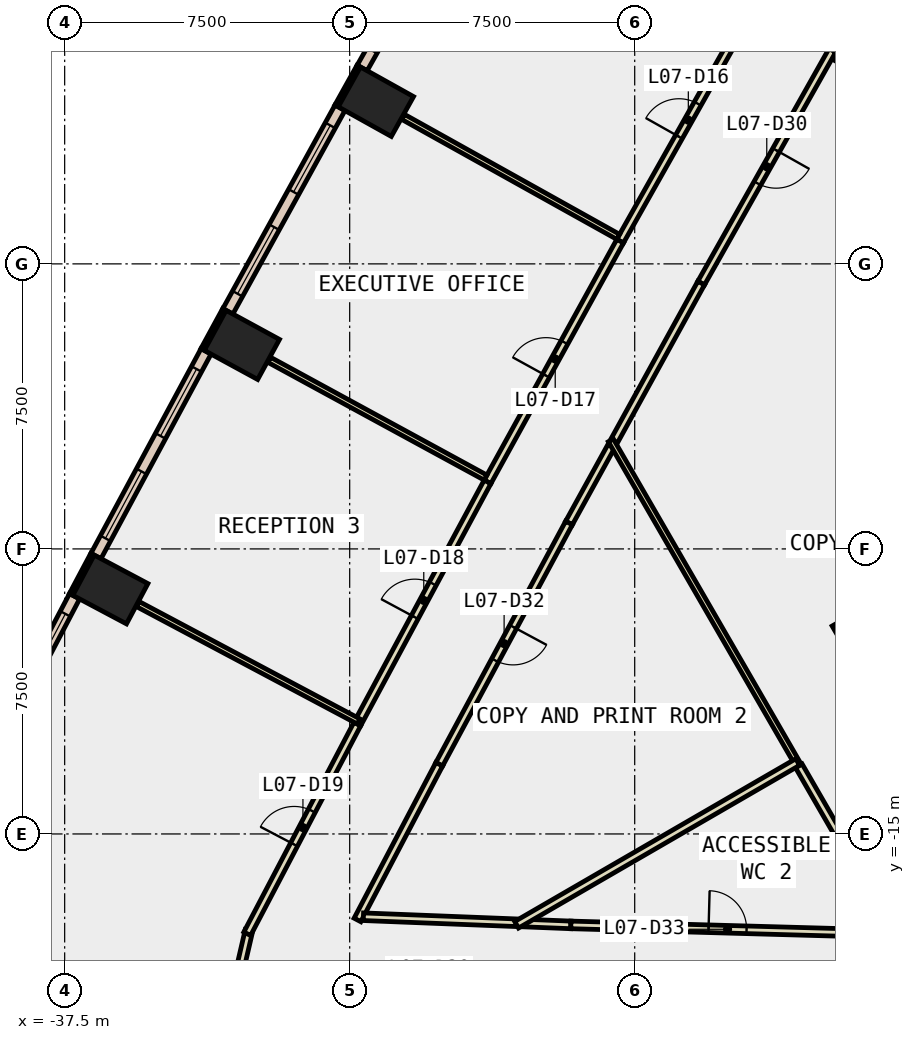
"""IFC4 building model, lengths in metres.
Left out: names, types, materials, properties, quantities, classifications, styles, units other than length and angle.
Written with IfcOpenShell. Run it as: python <this file> out.ifc"""

import sys

from ifc_helpers import new_model, si_unit, direction, frame, frame_2d, origin, origin_2d, place, context, subcontext, project, spatial, rectangle, extrude, element, fill, save


model = new_model("IFC4")
c1 = context("Model", 3, precision=1e-05, world=origin(), true_north=direction((0.0, 1.0)))
c2 = subcontext(c1, "Body", "Model", "MODEL_VIEW")
j1 = project(units=[si_unit("LENGTHUNIT", "METRE"), si_unit("PLANEANGLEUNIT", "RADIAN")], contexts=[c1])
p1 = place(None, origin())
s1 = spatial("IfcSite", under=j1, at=p1, CompositionType="ELEMENT")
p2 = place(p1, origin())
s2 = spatial("IfcBuilding", under=s1, at=p2, CompositionType="ELEMENT")
p3 = place(p2, frame((0.0, 0.0, 39.2)))
s3 = spatial("IfcBuildingStorey", under=s2, at=p3, CompositionType="ELEMENT", Elevation=39.2)
for number, where, z_axis, x_axis in (
    (1, (-29.311, 4.267, -0.4), (0.0, 0.0, 1.0), (0.487, 0.873, 0.0)),
    (2, (-32.837, -2.132, -0.4), (0.0, 0.0, 1.0), (0.478, 0.878, 0.0)),
    (3, (-36.298, -8.567, -0.4), (0.0, 0.0, 1.0), (0.469, 0.883, 0.0)),
):
    element("IfcColumn", number, at=place(p3, frame(where, z_axis=z_axis, x_axis=x_axis)), inside=s3, PredefinedType="COLUMN", context=c2, shape_type="SweptSolid", body=[
        extrude(rectangle(XDim=1.2, YDim=1.6, at=origin_2d()), origin(), (0.0, 0.0, 1.0), 4.2),
    ])
p4 = place(p3, frame((-9.31, -5.375, -0.4), z_axis=(0.0, 0.0, 1.0), x_axis=(-0.866017533419, -0.500013631625, 0.0)))
e4 = element("IfcWall", 4, at=p4, inside=s3, PredefinedType="SHEAR", context=c2, shape_type="SweptSolid", body=[
    extrude(rectangle(XDim=9.0, YDim=0.8, at=frame_2d((4.5, 0.0))), origin(), (0.0, 0.0, 1.0), 4.2),
])
p5 = place(p3, frame((-29.761, 5.205, 0.0), z_axis=(0.0, 0.0, 1.0), x_axis=(-0.486730996044, -0.87355190887, 0.0)))
e5 = element("IfcWall", 5, at=p5, inside=s3, PredefinedType="STANDARD", context=c2, shape_type="SweptSolid", body=[
    extrude(rectangle(XDim=1.2, YDim=0.1, at=frame_2d((0.6, 0.0))), origin(), (0.0, 0.0, 1.0), 3.8),
])
p6 = place(p3, frame((-33.296, -1.199, 0.0), z_axis=(0.0, 0.0, 1.0), x_axis=(-0.478424520456, -0.878128679765, 0.0)))
e6 = element("IfcWall", 6, at=p6, inside=s3, PredefinedType="STANDARD", context=c2, shape_type="SweptSolid", body=[
    extrude(rectangle(XDim=1.2, YDim=0.1, at=frame_2d((0.6, 0.0))), origin(), (0.0, 0.0, 1.0), 3.8),
])
p7 = place(p3, frame((-36.767, -7.639, 0.0), z_axis=(0.0, 0.0, 1.0), x_axis=(-0.469383408131, -0.882994459876, 0.0)))
e7 = element("IfcWall", 7, at=p7, inside=s3, PredefinedType="STANDARD", context=c2, shape_type="SweptSolid", body=[
    extrude(rectangle(XDim=1.199, YDim=0.1, at=frame_2d((0.6, 0.0))), origin(), (0.0, 0.0, 1.0), 3.8),
])
p8 = place(p3, frame((-26.667, 10.482, 0.0), z_axis=(0.0, 0.0, 1.0), x_axis=(-0.491278487323, -0.871002553322, 0.0)))
e8 = element("IfcWall", 8, at=p8, inside=s3, PredefinedType="STANDARD", context=c2, shape_type="SweptSolid", body=[
    extrude(rectangle(XDim=6.117, YDim=0.3, at=frame_2d((3.059, 0.0))), origin(), (0.0, 0.0, 1.0), 3.8),
])
p9 = place(p8, frame((0.529, 0.0, 0.9)))
e9 = element("IfcOpeningElement", 9, at=p9, cuts=e8, PredefinedType="OPENING", context=c2, shape_type="SweptSolid", body=[
    extrude(rectangle(XDim=2.0, YDim=2.6, at=frame_2d((1.0, 1.3))), frame((0.0, 0.16, 0.0), z_axis=(0.0, -1.0, 0.0), x_axis=(1.0, 0.0, 0.0)), (0.0, 0.0, 1.0), 0.32),
])
p10 = place(p8, frame((3.588, 0.0, 0.9)))
e10 = element("IfcOpeningElement", 10, at=p10, cuts=e8, PredefinedType="OPENING", context=c2, shape_type="SweptSolid", body=[
    extrude(rectangle(XDim=2.0, YDim=2.6, at=frame_2d((1.0, 1.3))), frame((0.0, 0.16, 0.0), z_axis=(0.0, -1.0, 0.0), x_axis=(1.0, 0.0, 0.0)), (0.0, 0.0, 1.0), 0.32),
])
p11 = place(p3, frame((-30.255, 4.107, 0.0), z_axis=(0.0, 0.0, 1.0), x_axis=(-0.482596003603, -0.875843078015, 0.0)))
e11 = element("IfcWall", 11, at=p11, inside=s3, PredefinedType="STANDARD", context=c2, shape_type="SweptSolid", body=[
    extrude(rectangle(XDim=6.115, YDim=0.3, at=frame_2d((3.058, 0.0))), origin(), (0.0, 0.0, 1.0), 3.8),
])
p12 = place(p11, frame((0.529, 0.0, 0.9)))
e12 = element("IfcOpeningElement", 12, at=p12, cuts=e11, PredefinedType="OPENING", context=c2, shape_type="SweptSolid", body=[
    extrude(rectangle(XDim=2.0, YDim=2.6, at=frame_2d((1.0, 1.3))), frame((0.0, 0.16, 0.0), z_axis=(0.0, -1.0, 0.0), x_axis=(1.0, 0.0, 0.0)), (0.0, 0.0, 1.0), 0.32),
])
p13 = place(p11, frame((3.586, 0.0, 0.9)))
e13 = element("IfcOpeningElement", 13, at=p13, cuts=e11, PredefinedType="OPENING", context=c2, shape_type="SweptSolid", body=[
    extrude(rectangle(XDim=2.0, YDim=2.6, at=frame_2d((1.0, 1.3))), frame((0.0, 0.16, 0.0), z_axis=(0.0, -1.0, 0.0), x_axis=(1.0, 0.0, 0.0)), (0.0, 0.0, 1.0), 0.32),
])
p14 = place(p3, frame((-33.779, -2.301, 0.0), z_axis=(0.0, 0.0, 1.0), x_axis=(-0.47375467653, -0.880656860795, 0.0)))
e14 = element("IfcWall", 14, at=p14, inside=s3, PredefinedType="STANDARD", context=c2, shape_type="SweptSolid", body=[
    extrude(rectangle(XDim=6.117, YDim=0.3, at=frame_2d((3.059, 0.0))), origin(), (0.0, 0.0, 1.0), 3.8),
])
p15 = place(p14, frame((0.529, 0.0, 0.9)))
e15 = element("IfcOpeningElement", 15, at=p15, cuts=e14, PredefinedType="OPENING", context=c2, shape_type="SweptSolid", body=[
    extrude(rectangle(XDim=2.0, YDim=2.6, at=frame_2d((1.0, 1.3))), frame((0.0, 0.16, 0.0), z_axis=(0.0, -1.0, 0.0), x_axis=(1.0, 0.0, 0.0)), (0.0, 0.0, 1.0), 0.32),
])
p16 = place(p14, frame((3.588, 0.0, 0.9)))
e16 = element("IfcOpeningElement", 16, at=p16, cuts=e14, PredefinedType="OPENING", context=c2, shape_type="SweptSolid", body=[
    extrude(rectangle(XDim=2.0, YDim=2.6, at=frame_2d((1.0, 1.3))), frame((0.0, 0.16, 0.0), z_axis=(0.0, -1.0, 0.0), x_axis=(1.0, 0.0, 0.0)), (0.0, 0.0, 1.0), 0.32),
])
p17 = place(p3, frame((-37.239, -8.746, 0.0), z_axis=(0.0, 0.0, 1.0), x_axis=(-0.464913987781, -0.885355851602, 0.0)))
e17 = element("IfcWall", 17, at=p17, inside=s3, PredefinedType="STANDARD", context=c2, shape_type="SweptSolid", body=[
    extrude(rectangle(XDim=6.094, YDim=0.3, at=frame_2d((3.047, 0.0))), origin(), (0.0, 0.0, 1.0), 3.8),
])
p18 = place(p17, frame((0.523, 0.0, 0.9)))
e18 = element("IfcOpeningElement", 18, at=p18, cuts=e17, PredefinedType="OPENING", context=c2, shape_type="SweptSolid", body=[
    extrude(rectangle(XDim=2.0, YDim=2.6, at=frame_2d((1.0, 1.3))), frame((0.0, 0.16, 0.0), z_axis=(0.0, -1.0, 0.0), x_axis=(1.0, 0.0, 0.0)), (0.0, 0.0, 1.0), 0.32),
])
p19 = place(p17, frame((3.57, 0.0, 0.9)))
e19 = element("IfcOpeningElement", 19, at=p19, cuts=e17, PredefinedType="OPENING", context=c2, shape_type="SweptSolid", body=[
    extrude(rectangle(XDim=2.0, YDim=2.6, at=frame_2d((1.0, 1.3))), frame((0.0, 0.16, 0.0), z_axis=(0.0, -1.0, 0.0), x_axis=(1.0, 0.0, 0.0)), (0.0, 0.0, 1.0), 0.32),
])
p20 = place(p3, frame((-17.261, 5.48, 0.0), z_axis=(0.0, 0.0, 1.0), x_axis=(0.865949187497, -0.500131987253, 0.0)))
e20 = element("IfcWall", 20, at=p20, inside=s3, PredefinedType="PARTITIONING", context=c2, shape_type="SweptSolid", body=[
    extrude(rectangle(XDim=3.939, YDim=0.2, at=frame_2d((1.969, 0.0))), origin(), (0.0, 0.0, 1.0), 3.8),
])
p21 = place(p3, frame((-17.299, 5.617, 0.0), z_axis=(0.0, 0.0, 1.0), x_axis=(-0.491166441632, -0.871065741844, 0.0)))
e21 = element("IfcWall", 21, at=p21, inside=s3, PredefinedType="PARTITIONING", context=c2, shape_type="SweptSolid", body=[
    extrude(rectangle(XDim=7.028, YDim=0.2, at=frame_2d((3.514, 0.0))), origin(), (0.0, 0.0, 1.0), 3.8),
])
p22 = place(p21, frame((3.014, 0.0, 0.0)))
e22 = element("IfcOpeningElement", 22, at=p22, cuts=e21, PredefinedType="OPENING", context=c2, shape_type="SweptSolid", body=[
    extrude(rectangle(XDim=1.0, YDim=2.1, at=frame_2d((0.5, 1.05))), frame((0.0, 0.11, 0.0), z_axis=(0.0, -1.0, 0.0), x_axis=(1.0, 0.0, 0.0)), (0.0, 0.0, 1.0), 0.22),
])
p23 = place(p3, frame((-20.751, -0.505, 0.0), z_axis=(0.0, 0.0, 1.0), x_axis=(-0.482566110981, -0.875859548405, 0.0)))
e23 = element("IfcWall", 23, at=p23, inside=s3, PredefinedType="PARTITIONING", context=c2, shape_type="SweptSolid", body=[
    extrude(rectangle(XDim=4.748, YDim=0.2, at=frame_2d((2.374, 0.0))), origin(), (0.0, 0.0, 1.0), 3.8),
])
p24 = place(p3, frame((-23.114, -4.794, 0.0), z_axis=(0.0, 0.0, 1.0), x_axis=(-0.482482362329, -0.875905685586, 0.0)))
e24 = element("IfcWall", 24, at=p24, inside=s3, PredefinedType="PARTITIONING", context=c2, shape_type="SweptSolid", body=[
    extrude(rectangle(XDim=2.311, YDim=0.2, at=frame_2d((1.156, 0.0))), origin(), (0.0, 0.0, 1.0), 3.8),
])
p25 = place(p3, frame((-24.229, -6.818, 0.0), z_axis=(0.0, 0.0, 1.0), x_axis=(-0.473714049803, -0.88067871498, 0.0)))
e25 = element("IfcWall", 25, at=p25, inside=s3, PredefinedType="PARTITIONING", context=c2, shape_type="SweptSolid", body=[
    extrude(rectangle(XDim=7.209, YDim=0.2, at=frame_2d((3.604, 0.0))), origin(), (0.0, 0.0, 1.0), 3.8),
])
p26 = place(p25, frame((3.104, 0.0, 0.0)))
e26 = element("IfcOpeningElement", 26, at=p26, cuts=e25, PredefinedType="OPENING", context=c2, shape_type="SweptSolid", body=[
    extrude(rectangle(XDim=1.0, YDim=2.1, at=frame_2d((0.5, 1.05))), frame((0.0, 0.11, 0.0), z_axis=(0.0, -1.0, 0.0), x_axis=(1.0, 0.0, 0.0)), (0.0, 0.0, 1.0), 0.22),
])
p27 = place(p3, frame((-27.644, -13.167, 0.0), z_axis=(0.0, 0.0, 1.0), x_axis=(-0.464919738277, -0.885352831904, 0.0)))
e27 = element("IfcWall", 27, at=p27, inside=s3, PredefinedType="PARTITIONING", context=c2, shape_type="SweptSolid", body=[
    extrude(rectangle(XDim=4.626, YDim=0.2, at=frame_2d((2.313, 0.0))), origin(), (0.0, 0.0, 1.0), 3.8),
])
p28 = place(p3, frame((-29.639, -17.178, 0.0), z_axis=(0.0, 0.0, 1.0), x_axis=(0.999228076722, -0.039284229546, 0.0)))
e28 = element("IfcWall", 28, at=p28, inside=s3, PredefinedType="PARTITIONING", context=c2, shape_type="SweptSolid", body=[
    extrude(rectangle(XDim=4.021, YDim=0.2, at=frame_2d((2.01, 0.0))), origin(), (0.0, 0.0, 1.0), 3.8),
])
p29 = place(p3, frame((-25.421, -17.344, 0.0), z_axis=(0.0, 0.0, 1.0), x_axis=(0.999219068508, -0.039512695804, 0.0)))
e29 = element("IfcWall", 29, at=p29, inside=s3, PredefinedType="PARTITIONING", context=c2, shape_type="SweptSolid", body=[
    extrude(rectangle(XDim=1.242, YDim=0.2, at=frame_2d((0.621, 0.0))), origin(), (0.0, 0.0, 1.0), 3.8),
])
p30 = place(p3, frame((-24.18, -17.393, 0.0), z_axis=(0.0, 0.0, 1.0), x_axis=(0.999611380121, -0.02787631132, 0.0)))
e30 = element("IfcWall", 30, at=p30, inside=s3, PredefinedType="PARTITIONING", context=c2, shape_type="SweptSolid", body=[
    extrude(rectangle(XDim=8.25, YDim=0.2, at=frame_2d((4.125, 0.0))), origin(), (0.0, 0.0, 1.0), 3.8),
])
p31 = place(p30, frame((3.625, 0.0, 0.0)))
e31 = element("IfcOpeningElement", 31, at=p31, cuts=e30, PredefinedType="OPENING", context=c2, shape_type="SweptSolid", body=[
    extrude(rectangle(XDim=1.0, YDim=2.1, at=frame_2d((0.5, 1.05))), frame((0.0, 0.11, 0.0), z_axis=(0.0, -1.0, 0.0), x_axis=(1.0, 0.0, 0.0)), (0.0, 0.0, 1.0), 0.22),
])
p32 = place(p3, frame((-22.884, 0.598, 0.0), z_axis=(0.0, 0.0, 1.0), x_axis=(0.491206176175, 0.871043335597, 0.0)))
e32 = element("IfcWall", 32, at=p32, inside=s3, PredefinedType="PARTITIONING", context=c2, shape_type="SweptSolid", body=[
    extrude(rectangle(XDim=7.309, YDim=0.2, at=frame_2d((3.654, 0.0))), origin(), (0.0, 0.0, 1.0), 3.8),
])
p33 = place(p32, frame((3.154, 0.0, 0.0)))
e33 = element("IfcOpeningElement", 33, at=p33, cuts=e32, PredefinedType="OPENING", context=c2, shape_type="SweptSolid", body=[
    extrude(rectangle(XDim=1.0, YDim=2.1, at=frame_2d((0.5, 1.05))), frame((0.0, 0.11, 0.0), z_axis=(0.0, -1.0, 0.0), x_axis=(1.0, 0.0, 0.0)), (0.0, 0.0, 1.0), 0.22),
])
p34 = place(p3, frame((-26.373, -5.736, 0.0), z_axis=(0.0, 0.0, 1.0), x_axis=(0.482587313112, 0.875847866483, 0.0)))
e34 = element("IfcWall", 34, at=p34, inside=s3, PredefinedType="PARTITIONING", context=c2, shape_type="SweptSolid", body=[
    extrude(rectangle(XDim=7.232, YDim=0.2, at=frame_2d((3.616, 0.0))), origin(), (0.0, 0.0, 1.0), 3.8),
])
p35 = place(p34, frame((3.191, 0.0, 0.0)))
e35 = element("IfcOpeningElement", 35, at=p35, cuts=e34, PredefinedType="OPENING", context=c2, shape_type="SweptSolid", body=[
    extrude(rectangle(XDim=1.0, YDim=2.1, at=frame_2d((0.5, 1.05))), frame((0.0, 0.11, 0.0), z_axis=(0.0, -1.0, 0.0), x_axis=(1.0, 0.0, 0.0)), (0.0, 0.0, 1.0), 0.22),
])
p36 = place(p3, frame((-29.799, -12.106, 0.0), z_axis=(0.0, 0.0, 1.0), x_axis=(0.473681086062, 0.880696445268, 0.0)))
e36 = element("IfcWall", 36, at=p36, inside=s3, PredefinedType="PARTITIONING", context=c2, shape_type="SweptSolid", body=[
    extrude(rectangle(XDim=7.233, YDim=0.2, at=frame_2d((3.616, 0.0))), origin(), (0.0, 0.0, 1.0), 3.8),
])
p37 = place(p36, frame((3.191, 0.0, 0.0)))
e37 = element("IfcOpeningElement", 37, at=p37, cuts=e36, PredefinedType="OPENING", context=c2, shape_type="SweptSolid", body=[
    extrude(rectangle(XDim=1.0, YDim=2.1, at=frame_2d((0.5, 1.05))), frame((0.0, 0.11, 0.0), z_axis=(0.0, -1.0, 0.0), x_axis=(1.0, 0.0, 0.0)), (0.0, 0.0, 1.0), 0.22),
])
p38 = place(p3, frame((-32.96, -18.874, 0.0), z_axis=(0.0, 0.0, 1.0), x_axis=(0.226081445763, 0.974108402531, 0.0)))
e38 = element("IfcWall", 38, at=p38, inside=s3, PredefinedType="PARTITIONING", context=c2, shape_type="SweptSolid", body=[
    extrude(rectangle(XDim=1.371, YDim=0.2, at=frame_2d((0.686, 0.0))), origin(), (0.0, 0.0, 1.0), 3.8),
])
p39 = place(p3, frame((-32.696, -17.626, 0.0), z_axis=(0.0, 0.0, 1.0), x_axis=(0.464767882002, 0.885432558617, 0.0)))
e39 = element("IfcWall", 39, at=p39, inside=s3, PredefinedType="PARTITIONING", context=c2, shape_type="SweptSolid", body=[
    extrude(rectangle(XDim=6.233, YDim=0.2, at=frame_2d((3.117, 0.0))), origin(), (0.0, 0.0, 1.0), 3.8),
])
p40 = place(p39, frame((2.654, 0.0, 0.0)))
e40 = element("IfcOpeningElement", 40, at=p40, cuts=e39, PredefinedType="OPENING", context=c2, shape_type="SweptSolid", body=[
    extrude(rectangle(XDim=1.0, YDim=2.1, at=frame_2d((0.5, 1.05))), frame((0.0, 0.11, 0.0), z_axis=(0.0, -1.0, 0.0), x_axis=(1.0, 0.0, 0.0)), (0.0, 0.0, 1.0), 0.22),
])
p41 = place(p3, frame((-18.182, -13.207, 0.0), z_axis=(0.0, 0.0, 1.0), x_axis=(-0.500081416649, 0.865978392757, 0.0)))
e41 = element("IfcWall", 41, at=p41, inside=s3, PredefinedType="PARTITIONING", context=c2, shape_type="SweptSolid", body=[
    extrude(rectangle(XDim=9.89, YDim=0.15, at=frame_2d((4.945, 0.0))), origin(), (0.0, 0.0, 1.0), 3.8),
])
p42 = place(p3, frame((-16.171, -16.692, 0.0), z_axis=(0.0, 0.0, 1.0), x_axis=(-0.499813503007, 0.866133051102, 0.0)))
e42 = element("IfcWall", 42, at=p42, inside=s3, PredefinedType="PARTITIONING", context=c2, shape_type="SweptSolid", body=[
    extrude(rectangle(XDim=4.023, YDim=0.2, at=frame_2d((2.012, 0.0))), origin(), (0.0, 0.0, 1.0), 3.8),
])
p43 = place(p3, frame((-18.211, -13.108, 0.0), z_axis=(0.0, 0.0, 1.0), x_axis=(-0.865421721769, -0.501044153235, 0.0)))
e43 = element("IfcWall", 43, at=p43, inside=s3, PredefinedType="PARTITIONING", context=c2, shape_type="SweptSolid", body=[
    extrude(rectangle(XDim=8.546, YDim=0.2, at=frame_2d((4.273, 0.0))), origin(), (0.0, 0.0, 1.0), 3.8),
])
p44 = place(p3, frame((-22.935, 0.712, 0.0), z_axis=(0.0, 0.0, 1.0), x_axis=(-0.873395616379, 0.487011393389, 0.0)))
e44 = element("IfcWall", 44, at=p44, inside=s3, PredefinedType="PARTITIONING", context=c2, shape_type="SweptSolid", body=[
    extrude(rectangle(XDim=6.48, YDim=0.15, at=frame_2d((3.24, 0.0))), origin(), (0.0, 0.0, 1.0), 3.8),
])
p45 = place(p3, frame((-26.425, -5.623, 0.0), z_axis=(0.0, 0.0, 1.0), x_axis=(-0.87825523631, 0.478192157919, 0.0)))
e45 = element("IfcWall", 45, at=p45, inside=s3, PredefinedType="PARTITIONING", context=c2, shape_type="SweptSolid", body=[
    extrude(rectangle(XDim=6.481, YDim=0.15, at=frame_2d((3.24, 0.0))), origin(), (0.0, 0.0, 1.0), 3.8),
])
p46 = place(p3, frame((-29.764, -12.04, 0.0), z_axis=(0.0, 0.0, 1.0), x_axis=(-0.883018657393, 0.469337885426, 0.0)))
e46 = element("IfcWall", 46, at=p46, inside=s3, PredefinedType="PARTITIONING", context=c2, shape_type="SweptSolid", body=[
    extrude(rectangle(XDim=6.58, YDim=0.15, at=frame_2d((3.29, 0.0))), origin(), (0.0, 0.0, 1.0), 3.8),
])
p47 = place(p12, origin())
e47 = element("IfcWindow", 47, at=p47, inside=s3, PartitioningType="SINGLE_PANEL", PredefinedType="WINDOW", context=c2, shape_type="SweptSolid", body=[
    extrude(rectangle(XDim=2.0, YDim=2.6, at=frame_2d((1.0, 1.3))), frame((0.0, 0.03, 0.0), z_axis=(0.0, -1.0, 0.0), x_axis=(1.0, 0.0, 0.0)), (0.0, 0.0, 1.0), 0.06),
])
fill(e12, e47)
p48 = place(p13, origin())
e48 = element("IfcWindow", 48, at=p48, inside=s3, PartitioningType="SINGLE_PANEL", PredefinedType="WINDOW", context=c2, shape_type="SweptSolid", body=[
    extrude(rectangle(XDim=2.0, YDim=2.6, at=frame_2d((1.0, 1.3))), frame((0.0, 0.03, 0.0), z_axis=(0.0, -1.0, 0.0), x_axis=(1.0, 0.0, 0.0)), (0.0, 0.0, 1.0), 0.06),
])
fill(e13, e48)
p49 = place(p15, origin())
e49 = element("IfcWindow", 49, at=p49, inside=s3, PartitioningType="SINGLE_PANEL", PredefinedType="WINDOW", context=c2, shape_type="SweptSolid", body=[
    extrude(rectangle(XDim=2.0, YDim=2.6, at=frame_2d((1.0, 1.3))), frame((0.0, 0.03, 0.0), z_axis=(0.0, -1.0, 0.0), x_axis=(1.0, 0.0, 0.0)), (0.0, 0.0, 1.0), 0.06),
])
fill(e15, e49)
p50 = place(p16, origin())
e50 = element("IfcWindow", 50, at=p50, inside=s3, PartitioningType="SINGLE_PANEL", PredefinedType="WINDOW", context=c2, shape_type="SweptSolid", body=[
    extrude(rectangle(XDim=2.0, YDim=2.6, at=frame_2d((1.0, 1.3))), frame((0.0, 0.03, 0.0), z_axis=(0.0, -1.0, 0.0), x_axis=(1.0, 0.0, 0.0)), (0.0, 0.0, 1.0), 0.06),
])
fill(e16, e50)
p51 = place(p18, origin())
e51 = element("IfcWindow", 51, at=p51, inside=s3, PartitioningType="SINGLE_PANEL", PredefinedType="WINDOW", context=c2, shape_type="SweptSolid", body=[
    extrude(rectangle(XDim=2.0, YDim=2.6, at=frame_2d((1.0, 1.3))), frame((0.0, 0.03, 0.0), z_axis=(0.0, -1.0, 0.0), x_axis=(1.0, 0.0, 0.0)), (0.0, 0.0, 1.0), 0.06),
])
fill(e18, e51)
p52 = place(p33, origin())
e52 = element("IfcDoor", 52, at=p52, inside=s3, OperationType="SINGLE_SWING_RIGHT", PredefinedType="DOOR", context=c2, shape_type="SweptSolid", body=[
    extrude(rectangle(XDim=1.0, YDim=2.1, at=frame_2d((0.5, 1.05))), frame((0.0, 0.025, 0.0), z_axis=(0.0, -1.0, 0.0), x_axis=(1.0, 0.0, 0.0)), (0.0, 0.0, 1.0), 0.05),
])
fill(e33, e52)
p53 = place(p35, origin())
e53 = element("IfcDoor", 53, at=p53, inside=s3, OperationType="SINGLE_SWING_LEFT", PredefinedType="DOOR", context=c2, shape_type="SweptSolid", body=[
    extrude(rectangle(XDim=1.0, YDim=2.1, at=frame_2d((0.5, 1.05))), frame((0.0, 0.025, 0.0), z_axis=(0.0, -1.0, 0.0), x_axis=(1.0, 0.0, 0.0)), (0.0, 0.0, 1.0), 0.05),
])
fill(e35, e53)
p54 = place(p37, origin())
e54 = element("IfcDoor", 54, at=p54, inside=s3, OperationType="SINGLE_SWING_RIGHT", PredefinedType="DOOR", context=c2, shape_type="SweptSolid", body=[
    extrude(rectangle(XDim=1.0, YDim=2.1, at=frame_2d((0.5, 1.05))), frame((0.0, 0.025, 0.0), z_axis=(0.0, -1.0, 0.0), x_axis=(1.0, 0.0, 0.0)), (0.0, 0.0, 1.0), 0.05),
])
fill(e37, e54)
p55 = place(p40, origin())
e55 = element("IfcDoor", 55, at=p55, inside=s3, OperationType="SINGLE_SWING_RIGHT", PredefinedType="DOOR", context=c2, shape_type="SweptSolid", body=[
    extrude(rectangle(XDim=1.0, YDim=2.1, at=frame_2d((0.5, 1.05))), frame((0.0, 0.025, 0.0), z_axis=(0.0, -1.0, 0.0), x_axis=(1.0, 0.0, 0.0)), (0.0, 0.0, 1.0), 0.05),
])
fill(e40, e55)
p56 = place(p22, origin())
e56 = element("IfcDoor", 56, at=p56, inside=s3, OperationType="SINGLE_SWING_RIGHT", PredefinedType="DOOR", context=c2, shape_type="SweptSolid", body=[
    extrude(rectangle(XDim=1.0, YDim=2.1, at=frame_2d((0.5, 1.05))), frame((0.0, 0.025, 0.0), z_axis=(0.0, -1.0, 0.0), x_axis=(1.0, 0.0, 0.0)), (0.0, 0.0, 1.0), 0.05),
])
fill(e22, e56)
p57 = place(p26, origin())
e57 = element("IfcDoor", 57, at=p57, inside=s3, OperationType="SINGLE_SWING_RIGHT", PredefinedType="DOOR", context=c2, shape_type="SweptSolid", body=[
    extrude(rectangle(XDim=1.0, YDim=2.1, at=frame_2d((0.5, 1.05))), frame((0.0, 0.025, 0.0), z_axis=(0.0, -1.0, 0.0), x_axis=(1.0, 0.0, 0.0)), (0.0, 0.0, 1.0), 0.05),
])
fill(e26, e57)
p58 = place(p31, origin())
e58 = element("IfcDoor", 58, at=p58, inside=s3, OperationType="SINGLE_SWING_RIGHT", PredefinedType="DOOR", context=c2, shape_type="SweptSolid", body=[
    extrude(rectangle(XDim=1.0, YDim=2.1, at=frame_2d((0.5, 1.05))), frame((0.0, 0.025, 0.0), z_axis=(0.0, -1.0, 0.0), x_axis=(1.0, 0.0, 0.0)), (0.0, 0.0, 1.0), 0.05),
])
fill(e31, e58)
save(model, sys.argv[1])
